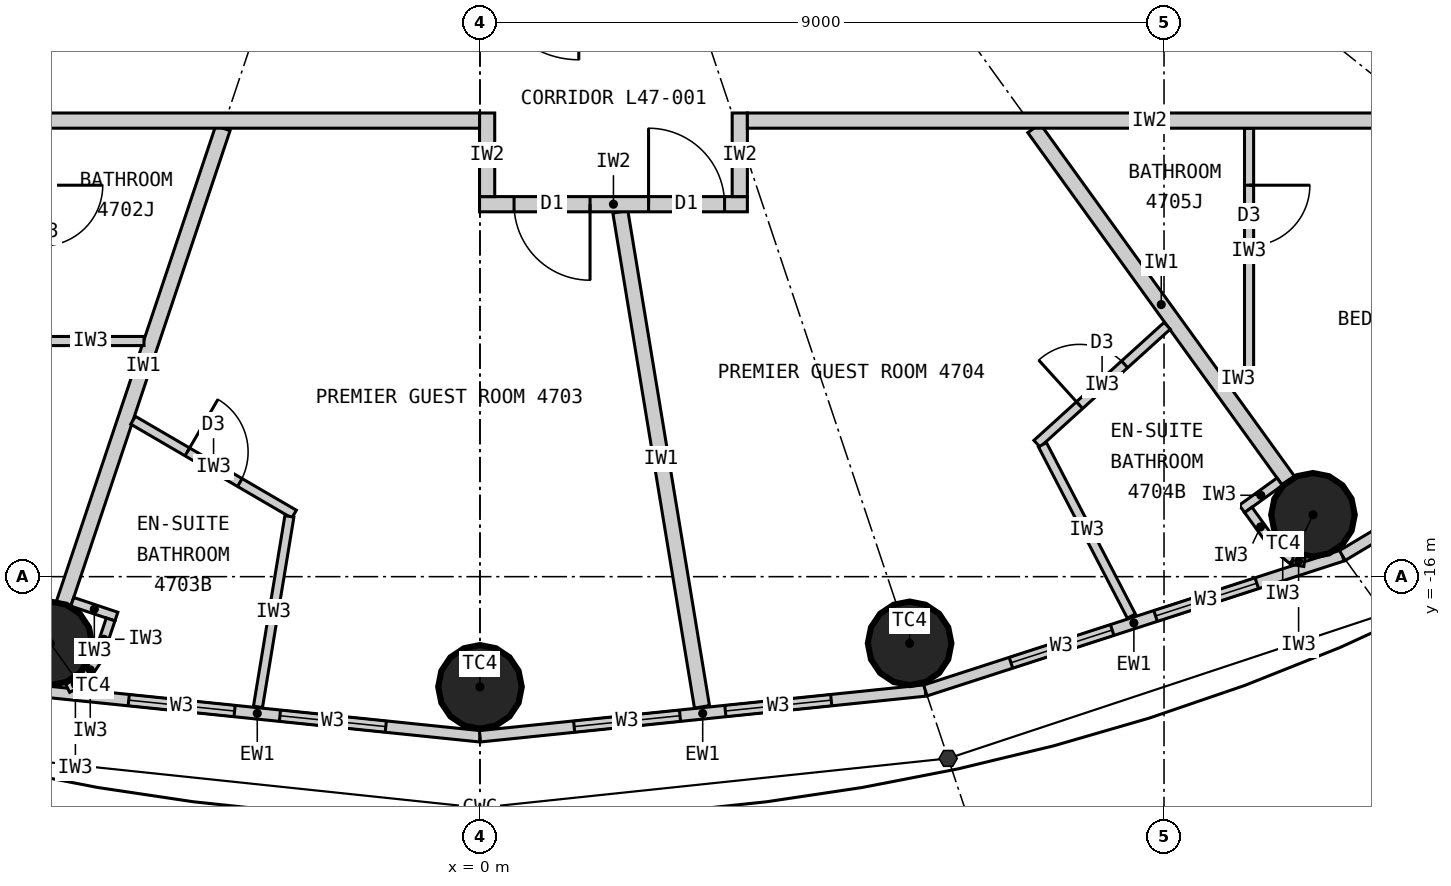
"""IFC4 building model, lengths in metres.
Left out: names, types, materials, properties, quantities, classifications, styles, units other than length and angle.
Written with IfcOpenShell. Run it as: python <this file> out.ifc"""

import sys

from ifc_helpers import new_model, si_unit, direction, frame, frame_2d, origin, origin_2d, place, context, subcontext, project, spatial, rectangle, circle, extrude, element, fill, save


model = new_model("IFC4")
c1 = context("Model", 3, precision=1e-05, world=origin(), true_north=direction((0.0, 1.0)))
c2 = subcontext(c1, "Body", "Model", "MODEL_VIEW")
j1 = project(units=[si_unit("LENGTHUNIT", "METRE"), si_unit("PLANEANGLEUNIT", "RADIAN")], contexts=[c1])
p1 = place(None, origin())
s1 = spatial("IfcSite", under=j1, at=p1, CompositionType="ELEMENT")
p2 = place(p1, origin())
s2 = spatial("IfcBuilding", under=s1, at=p2, CompositionType="ELEMENT")
p3 = place(p2, frame((0.0, 0.0, 176.4)))
s3 = spatial("IfcBuildingStorey", under=s2, at=p3, CompositionType="ELEMENT", Elevation=176.4)
for number, where, z_axis, x_axis in (
    (1, (-5.653, -16.877, 0.0), (0.0, 0.0, 1.0), (1.0, 0.0, 0.0)),
    (2, (0.0, -17.45, 0.0), (0.0, 0.0, 1.0), (1.0, 0.0, 0.0)),
    (3, (5.653, -16.877, 0.0), (0.0, 0.0, 1.0), (1.0, 0.0, 0.0)),
    (4, (10.96, -15.186, 0.0), (0.0, 0.0, 1.0), (1.0, 0.0, 0.0)),
):
    element("IfcColumn", number, at=place(p3, frame(where, z_axis=z_axis, x_axis=x_axis)), inside=s3, PredefinedType="COLUMN", context=c2, shape_type="SweptSolid", body=[
        extrude(circle(Radius=0.55, at=origin_2d()), origin(), (0.0, 0.0, 1.0), 3.3),
    ])
p4 = place(p3, frame((-5.86, -17.497, 0.0), z_axis=(0.0, 0.0, 1.0), x_axis=(0.994751738032, -0.102318032045, 0.0)))
e5 = element("IfcWall", 5, at=p4, inside=s3, PredefinedType="ELEMENTEDWALL", context=c2, shape_type="SweptSolid", body=[
    extrude(rectangle(XDim=5.891, YDim=0.15, at=frame_2d((2.946, 0.0))), origin(), (0.0, 0.0, 1.0), 3.12),
])
p5 = place(p4, frame((1.246, 0.0, 0.9)))
e6 = element("IfcOpeningElement", 6, at=p5, cuts=e5, PredefinedType="OPENING", context=c2, shape_type="SweptSolid", body=[
    extrude(rectangle(XDim=1.4, YDim=1.9, at=frame_2d((0.7, 0.95))), frame((0.0, 0.085, 0.0), z_axis=(0.0, -1.0, 0.0), x_axis=(1.0, 0.0, 0.0)), (0.0, 0.0, 1.0), 0.17),
])
p6 = place(p4, frame((3.246, 0.0, 0.9)))
e7 = element("IfcOpeningElement", 7, at=p6, cuts=e5, PredefinedType="OPENING", context=c2, shape_type="SweptSolid", body=[
    extrude(rectangle(XDim=1.4, YDim=1.9, at=frame_2d((0.7, 0.95))), frame((0.0, 0.085, 0.0), z_axis=(0.0, -1.0, 0.0), x_axis=(1.0, 0.0, 0.0)), (0.0, 0.0, 1.0), 0.17),
])
p7 = place(p3, frame((0.0, -18.1, 0.0), z_axis=(0.0, 0.0, 1.0), x_axis=(0.994751738032, 0.102318032045, 0.0)))
e8 = element("IfcWall", 8, at=p7, inside=s3, PredefinedType="ELEMENTEDWALL", context=c2, shape_type="SweptSolid", body=[
    extrude(rectangle(XDim=5.891, YDim=0.15, at=frame_2d((2.946, 0.0))), origin(), (0.0, 0.0, 1.0), 3.12),
])
p8 = place(p7, frame((1.246, 0.0, 0.9)))
e9 = element("IfcOpeningElement", 9, at=p8, cuts=e8, PredefinedType="OPENING", context=c2, shape_type="SweptSolid", body=[
    extrude(rectangle(XDim=1.4, YDim=1.9, at=frame_2d((0.7, 0.95))), frame((0.0, 0.085, 0.0), z_axis=(0.0, -1.0, 0.0), x_axis=(1.0, 0.0, 0.0)), (0.0, 0.0, 1.0), 0.17),
])
p9 = place(p7, frame((3.246, 0.0, 0.9)))
e10 = element("IfcOpeningElement", 10, at=p9, cuts=e8, PredefinedType="OPENING", context=c2, shape_type="SweptSolid", body=[
    extrude(rectangle(XDim=1.4, YDim=1.9, at=frame_2d((0.7, 0.95))), frame((0.0, 0.085, 0.0), z_axis=(0.0, -1.0, 0.0), x_axis=(1.0, 0.0, 0.0)), (0.0, 0.0, 1.0), 0.17),
])
p10 = place(p3, frame((5.86, -17.497, 0.0), z_axis=(0.0, 0.0, 1.0), x_axis=(0.951432482129, 0.307857486429, 0.0)))
e11 = element("IfcWall", 11, at=p10, inside=s3, PredefinedType="ELEMENTEDWALL", context=c2, shape_type="SweptSolid", body=[
    extrude(rectangle(XDim=5.766, YDim=0.15, at=frame_2d((2.883, 0.0))), origin(), (0.0, 0.0, 1.0), 3.12),
])
p11 = place(p10, frame((1.183, 0.0, 0.9)))
e12 = element("IfcOpeningElement", 12, at=p11, cuts=e11, PredefinedType="OPENING", context=c2, shape_type="SweptSolid", body=[
    extrude(rectangle(XDim=1.4, YDim=1.9, at=frame_2d((0.7, 0.95))), frame((0.0, 0.085, 0.0), z_axis=(0.0, -1.0, 0.0), x_axis=(1.0, 0.0, 0.0)), (0.0, 0.0, 1.0), 0.17),
])
p12 = place(p10, frame((3.183, 0.0, 0.9)))
e13 = element("IfcOpeningElement", 13, at=p12, cuts=e11, PredefinedType="OPENING", context=c2, shape_type="SweptSolid", body=[
    extrude(rectangle(XDim=1.4, YDim=1.9, at=frame_2d((0.7, 0.95))), frame((0.0, 0.085, 0.0), z_axis=(0.0, -1.0, 0.0), x_axis=(1.0, 0.0, 0.0)), (0.0, 0.0, 1.0), 0.17),
])
p13 = place(p3, frame((11.346, -15.722, 0.0), z_axis=(0.0, 0.0, 1.0), x_axis=(0.857695199231, 0.514158482587, 0.0)))
e14 = element("IfcWall", 14, at=p13, inside=s3, PredefinedType="ELEMENTEDWALL", context=c2, shape_type="SweptSolid", body=[
    extrude(rectangle(XDim=5.536, YDim=0.15, at=frame_2d((2.768, 0.0))), origin(), (0.0, 0.0, 1.0), 3.12),
])
p14 = place(p13, frame((1.068, 0.0, 0.9)))
e15 = element("IfcOpeningElement", 15, at=p14, cuts=e14, PredefinedType="OPENING", context=c2, shape_type="SweptSolid", body=[
    extrude(rectangle(XDim=1.4, YDim=1.9, at=frame_2d((0.7, 0.95))), frame((0.0, 0.085, 0.0), z_axis=(0.0, -1.0, 0.0), x_axis=(1.0, 0.0, 0.0)), (0.0, 0.0, 1.0), 0.17),
])
p15 = place(p13, frame((3.068, 0.0, 0.9)))
e16 = element("IfcOpeningElement", 16, at=p15, cuts=e14, PredefinedType="OPENING", context=c2, shape_type="SweptSolid", body=[
    extrude(rectangle(XDim=1.4, YDim=1.9, at=frame_2d((0.7, 0.95))), frame((0.0, 0.085, 0.0), z_axis=(0.0, -1.0, 0.0), x_axis=(1.0, 0.0, 0.0)), (0.0, 0.0, 1.0), 0.17),
])
p16 = place(p3, frame((-3.383, -10.1, 0.0), z_axis=(0.0, 0.0, 1.0), x_axis=(-0.317615120474, -0.948219718866, 0.0)))
e17 = element("IfcWall", 17, at=p16, inside=s3, PredefinedType="PARTITIONING", context=c2, shape_type="SweptSolid", body=[
    extrude(rectangle(XDim=6.597, YDim=0.2, at=frame_2d((3.299, 0.0))), origin(), (0.0, 0.0, 1.0), 2.42),
])
p17 = place(p3, frame((1.847, -11.2, 0.0), z_axis=(0.0, 0.0, 1.0), x_axis=(0.162695449404, -0.986676335352, 0.0)))
e18 = element("IfcWall", 18, at=p17, inside=s3, PredefinedType="PARTITIONING", context=c2, shape_type="SweptSolid", body=[
    extrude(rectangle(XDim=6.601, YDim=0.2, at=frame_2d((3.301, 0.0))), origin(), (0.0, 0.0, 1.0), 3.12),
])
p18 = place(p3, frame((7.289, -10.1, 0.0), z_axis=(0.0, 0.0, 1.0), x_axis=(0.585222595178, -0.810872686735, 0.0)))
e19 = element("IfcWall", 19, at=p18, inside=s3, PredefinedType="PARTITIONING", context=c2, shape_type="SweptSolid", body=[
    extrude(rectangle(XDim=5.722, YDim=0.2, at=frame_2d((2.861, 0.0))), origin(), (0.0, 0.0, 1.0), 2.42),
])
p19 = place(p3, frame((3.518, -11.1, 0.0), z_axis=(0.0, 0.0, 1.0), x_axis=(-1.0, 0.0, 0.0)))
e20 = element("IfcWall", 20, at=p19, inside=s3, PredefinedType="PARTITIONING", context=c2, shape_type="SweptSolid", body=[
    extrude(rectangle(XDim=3.524, YDim=0.2, at=frame_2d((1.762, 0.0))), origin(), (0.0, 0.0, 1.0), 3.12),
])
p20 = place(p19, frame((2.07, 0.0, 0.0)))
e21 = element("IfcOpeningElement", 21, at=p20, cuts=e20, PredefinedType="OPENING", context=c2, shape_type="SweptSolid", body=[
    extrude(rectangle(XDim=1.0, YDim=2.2, at=frame_2d((0.5, 1.1))), frame((0.0, 0.11, 0.0), z_axis=(0.0, -1.0, 0.0), x_axis=(1.0, 0.0, 0.0)), (0.0, 0.0, 1.0), 0.22),
])
p21 = place(p19, frame((0.3, 0.0, 0.0)))
e22 = element("IfcOpeningElement", 22, at=p21, cuts=e20, PredefinedType="OPENING", context=c2, shape_type="SweptSolid", body=[
    extrude(rectangle(XDim=1.0, YDim=2.2, at=frame_2d((0.5, 1.1))), frame((0.0, 0.11, 0.0), z_axis=(0.0, -1.0, 0.0), x_axis=(1.0, 0.0, 0.0)), (0.0, 0.0, 1.0), 0.22),
])
p22 = place(p3, frame((3.418, -9.9, 0.0), z_axis=(0.0, 0.0, 1.0), x_axis=(0.0, -1.0, 0.0)))
e23 = element("IfcWall", 23, at=p22, inside=s3, PredefinedType="PARTITIONING", context=c2, shape_type="SweptSolid", body=[
    extrude(rectangle(XDim=1.1, YDim=0.2, at=frame_2d((0.55, 0.0))), origin(), (0.0, 0.0, 1.0), 3.12),
])
p23 = place(p3, frame((0.094, -9.9, 0.0), z_axis=(0.0, 0.0, 1.0), x_axis=(0.0, -1.0, 0.0)))
e24 = element("IfcWall", 24, at=p23, inside=s3, PredefinedType="PARTITIONING", context=c2, shape_type="SweptSolid", body=[
    extrude(rectangle(XDim=1.1, YDim=0.2, at=frame_2d((0.55, 0.0))), origin(), (0.0, 0.0, 1.0), 2.42),
])
p24 = place(p3, frame((-4.421, -12.9, 0.0), z_axis=(0.0, 0.0, 1.0), x_axis=(-1.0, 0.0, 0.0)))
e25 = element("IfcWall", 25, at=p24, inside=s3, PredefinedType="PARTITIONING", context=c2, shape_type="SweptSolid", body=[
    extrude(rectangle(XDim=1.402, YDim=0.12, at=frame_2d((0.701, 0.0))), origin(), (0.0, 0.0, 1.0), 3.12),
])
p25 = place(p3, frame((-4.564, -13.942, 0.0), z_axis=(0.0, 0.0, 1.0), x_axis=(0.863717519451, -0.503976236139, 0.0)))
e26 = element("IfcWall", 26, at=p25, inside=s3, PredefinedType="PARTITIONING", context=c2, shape_type="SweptSolid", body=[
    extrude(rectangle(XDim=2.453, YDim=0.12, at=frame_2d((1.226, 0.0))), origin(), (0.0, 0.0, 1.0), 3.12),
])
p26 = place(p25, frame((0.826, 0.0, 0.0)))
e27 = element("IfcOpeningElement", 27, at=p26, cuts=e26, PredefinedType="OPENING", context=c2, shape_type="SweptSolid", body=[
    extrude(rectangle(XDim=0.8, YDim=2.1, at=frame_2d((0.4, 1.05))), frame((0.0, 0.07, 0.0), z_axis=(0.0, -1.0, 0.0), x_axis=(1.0, 0.0, 0.0)), (0.0, 0.0, 1.0), 0.14),
])
p27 = place(p3, frame((-2.508, -15.207, 0.0), z_axis=(0.0, 0.0, 1.0), x_axis=(-0.162637365963, -0.986685911115, 0.0)))
e28 = element("IfcWall", 28, at=p27, inside=s3, PredefinedType="PARTITIONING", context=c2, shape_type="SweptSolid", body=[
    extrude(rectangle(XDim=2.54, YDim=0.12, at=frame_2d((1.27, 0.0))), origin(), (0.0, 0.0, 1.0), 3.12),
])
p28 = place(p3, frame((-5.364, -16.331, 0.0), z_axis=(0.0, 0.0, 1.0), x_axis=(0.948283770087, -0.317423835572, 0.0)))
e29 = element("IfcWall", 29, at=p28, inside=s3, PredefinedType="PARTITIONING", context=c2, shape_type="SweptSolid", body=[
    extrude(rectangle(XDim=0.612, YDim=0.12, at=frame_2d((0.306, 0.0))), origin(), (0.0, 0.0, 1.0), 3.12),
])
p29 = place(p3, frame((-4.86, -16.563, 0.0), z_axis=(0.0, 0.0, 1.0), x_axis=(-0.317825321803, -0.948149284038, 0.0)))
e30 = element("IfcWall", 30, at=p29, inside=s3, PredefinedType="PARTITIONING", context=c2, shape_type="SweptSolid", body=[
    extrude(rectangle(XDim=0.55, YDim=0.12, at=frame_2d((0.275, 0.0))), origin(), (0.0, 0.0, 1.0), 3.12),
])
p30 = place(p3, frame((-5.034, -17.084, 0.0), z_axis=(0.0, 0.0, 1.0), x_axis=(-0.552362205726, -0.833604218851, 0.0)))
e31 = element("IfcWall", 31, at=p30, inside=s3, PredefinedType="PARTITIONING", context=c2, shape_type="SweptSolid", body=[
    extrude(rectangle(XDim=0.338, YDim=0.12, at=frame_2d((0.169, 0.0))), origin(), (0.0, 0.0, 1.0), 3.12),
])
p31 = place(p3, frame((-5.221, -17.366, 0.0), z_axis=(0.0, 0.0, 1.0), x_axis=(-0.895067896179, -0.445929883759, 0.0)))
e32 = element("IfcWall", 32, at=p31, inside=s3, PredefinedType="PARTITIONING", context=c2, shape_type="SweptSolid", body=[
    extrude(rectangle(XDim=0.228, YDim=0.12, at=frame_2d((0.114, 0.0))), origin(), (0.0, 0.0, 1.0), 3.12),
])
p32 = place(p3, frame((9.042, -12.699, 0.0), z_axis=(0.0, 0.0, 1.0), x_axis=(-0.741100257539, -0.671394376112, 0.0)))
e33 = element("IfcWall", 33, at=p32, inside=s3, PredefinedType="PARTITIONING", context=c2, shape_type="SweptSolid", body=[
    extrude(rectangle(XDim=2.312, YDim=0.12, at=frame_2d((1.156, 0.0))), origin(), (0.0, 0.0, 1.0), 3.12),
])
p33 = place(p32, frame((0.756, 0.0, 0.0)))
e34 = element("IfcOpeningElement", 34, at=p33, cuts=e33, PredefinedType="OPENING", context=c2, shape_type="SweptSolid", body=[
    extrude(rectangle(XDim=0.8, YDim=2.1, at=frame_2d((0.4, 1.05))), frame((0.0, 0.07, 0.0), z_axis=(0.0, -1.0, 0.0), x_axis=(1.0, 0.0, 0.0)), (0.0, 0.0, 1.0), 0.14),
])
p34 = place(p3, frame((7.401, -14.264, 0.0), z_axis=(0.0, 0.0, 1.0), x_axis=(0.460505131319, -0.887657041897, 0.0)))
e35 = element("IfcWall", 35, at=p34, inside=s3, PredefinedType="PARTITIONING", context=c2, shape_type="SweptSolid", body=[
    extrude(rectangle(XDim=2.54, YDim=0.12, at=frame_2d((1.27, 0.0))), origin(), (0.0, 0.0, 1.0), 3.12),
])
p35 = place(p3, frame((10.522, -14.75, 0.0), z_axis=(0.0, 0.0, 1.0), x_axis=(-0.811057588427, -0.584966313777, 0.0)))
e36 = element("IfcWall", 36, at=p35, inside=s3, PredefinedType="PARTITIONING", context=c2, shape_type="SweptSolid", body=[
    extrude(rectangle(XDim=0.612, YDim=0.12, at=frame_2d((0.306, 0.0))), origin(), (0.0, 0.0, 1.0), 3.12),
])
p36 = place(p3, frame((10.109, -15.122, 0.0), z_axis=(0.0, 0.0, 1.0), x_axis=(0.585344718358, -0.810784534072, 0.0)))
e37 = element("IfcWall", 37, at=p36, inside=s3, PredefinedType="PARTITIONING", context=c2, shape_type="SweptSolid", body=[
    extrude(rectangle(XDim=0.55, YDim=0.12, at=frame_2d((0.275, 0.0))), origin(), (0.0, 0.0, 1.0), 3.12),
])
p37 = place(p3, frame((10.431, -15.568, 0.0), z_axis=(0.0, 0.0, 1.0), x_axis=(0.77505137267, -0.631898227345, 0.0)))
e38 = element("IfcWall", 38, at=p37, inside=s3, PredefinedType="PARTITIONING", context=c2, shape_type="SweptSolid", body=[
    extrude(rectangle(XDim=0.338, YDim=0.12, at=frame_2d((0.169, 0.0))), origin(), (0.0, 0.0, 1.0), 3.12),
])
p38 = place(p3, frame((10.693, -15.781, 0.0), z_axis=(0.0, 0.0, 1.0), x_axis=(0.987256785332, -0.159135287777, 0.0)))
e39 = element("IfcWall", 39, at=p38, inside=s3, PredefinedType="PARTITIONING", context=c2, shape_type="SweptSolid", body=[
    extrude(rectangle(XDim=0.158, YDim=0.12, at=frame_2d((0.079, 0.0))), origin(), (0.0, 0.0, 1.0), 3.12),
])
p39 = place(p3, frame((9.771, -13.4, 0.0), z_axis=(0.0, 0.0, 1.0), x_axis=(1.0, 0.0, 0.0)))
e40 = element("IfcWall", 40, at=p39, inside=s3, PredefinedType="PARTITIONING", context=c2, shape_type="SweptSolid", body=[
    extrude(rectangle(XDim=0.408, YDim=0.12, at=frame_2d((0.204, 0.0))), origin(), (0.0, 0.0, 1.0), 3.12),
])
p40 = place(p3, frame((10.119, -10.1, 0.0), z_axis=(0.0, 0.0, 1.0), x_axis=(0.0, -1.0, 0.0)))
e41 = element("IfcWall", 41, at=p40, inside=s3, PredefinedType="PARTITIONING", context=c2, shape_type="SweptSolid", body=[
    extrude(rectangle(XDim=3.24, YDim=0.12, at=frame_2d((1.62, 0.0))), origin(), (0.0, 0.0, 1.0), 3.12),
])
p41 = place(p40, frame((0.75, 0.0, 0.0)))
e42 = element("IfcOpeningElement", 42, at=p41, cuts=e41, PredefinedType="OPENING", context=c2, shape_type="SweptSolid", body=[
    extrude(rectangle(XDim=0.8, YDim=2.1, at=frame_2d((0.4, 1.05))), frame((0.0, 0.07, 0.0), z_axis=(0.0, -1.0, 0.0), x_axis=(1.0, 0.0, 0.0)), (0.0, 0.0, 1.0), 0.14),
])
p42 = place(p3, frame((14.1, -10.0, 0.0), z_axis=(0.0, 0.0, 1.0), x_axis=(-1.0, 0.0, 0.0)))
e43 = element("IfcWall", 43, at=p42, inside=s3, PredefinedType="PARTITIONING", context=c2, shape_type="SweptSolid", body=[
    extrude(rectangle(XDim=10.582, YDim=0.2, at=frame_2d((5.291, 0.0))), origin(), (0.0, 0.0, 1.0), 3.12),
])
p43 = place(p3, frame((-0.006, -10.0, 0.0), z_axis=(0.0, 0.0, 1.0), x_axis=(-1.0, 0.0, 0.0)))
e44 = element("IfcWall", 44, at=p43, inside=s3, PredefinedType="PARTITIONING", context=c2, shape_type="SweptSolid", body=[
    extrude(rectangle(XDim=14.094, YDim=0.2, at=frame_2d((7.047, 0.0))), origin(), (0.0, 0.0, 1.0), 3.12),
])
p44 = place(p43, frame((10.059, 0.0, 0.0)))
e45 = element("IfcOpeningElement", 45, at=p44, cuts=e44, PredefinedType="OPENING", context=c2, shape_type="SweptSolid", body=[
    extrude(rectangle(XDim=1.0, YDim=2.2, at=frame_2d((0.5, 1.1))), frame((0.0, 0.11, 0.0), z_axis=(0.0, -1.0, 0.0), x_axis=(1.0, 0.0, 0.0)), (0.0, 0.0, 1.0), 0.22),
])
p45 = place(p5, origin())
e46 = element("IfcWindow", 46, at=p45, inside=s3, PartitioningType="SINGLE_PANEL", PredefinedType="WINDOW", context=c2, shape_type="SweptSolid", body=[
    extrude(rectangle(XDim=1.4, YDim=1.9, at=frame_2d((0.7, 0.95))), frame((0.0, 0.03, 0.0), z_axis=(0.0, -1.0, 0.0), x_axis=(1.0, 0.0, 0.0)), (0.0, 0.0, 1.0), 0.06),
])
fill(e6, e46)
p46 = place(p6, origin())
e47 = element("IfcWindow", 47, at=p46, inside=s3, PartitioningType="SINGLE_PANEL", PredefinedType="WINDOW", context=c2, shape_type="SweptSolid", body=[
    extrude(rectangle(XDim=1.4, YDim=1.9, at=frame_2d((0.7, 0.95))), frame((0.0, 0.03, 0.0), z_axis=(0.0, -1.0, 0.0), x_axis=(1.0, 0.0, 0.0)), (0.0, 0.0, 1.0), 0.06),
])
fill(e7, e47)
p47 = place(p8, origin())
e48 = element("IfcWindow", 48, at=p47, inside=s3, PartitioningType="SINGLE_PANEL", PredefinedType="WINDOW", context=c2, shape_type="SweptSolid", body=[
    extrude(rectangle(XDim=1.4, YDim=1.9, at=frame_2d((0.7, 0.95))), frame((0.0, 0.03, 0.0), z_axis=(0.0, -1.0, 0.0), x_axis=(1.0, 0.0, 0.0)), (0.0, 0.0, 1.0), 0.06),
])
fill(e9, e48)
p48 = place(p9, origin())
e49 = element("IfcWindow", 49, at=p48, inside=s3, PartitioningType="SINGLE_PANEL", PredefinedType="WINDOW", context=c2, shape_type="SweptSolid", body=[
    extrude(rectangle(XDim=1.4, YDim=1.9, at=frame_2d((0.7, 0.95))), frame((0.0, 0.03, 0.0), z_axis=(0.0, -1.0, 0.0), x_axis=(1.0, 0.0, 0.0)), (0.0, 0.0, 1.0), 0.06),
])
fill(e10, e49)
p49 = place(p11, origin())
e50 = element("IfcWindow", 50, at=p49, inside=s3, PartitioningType="SINGLE_PANEL", PredefinedType="WINDOW", context=c2, shape_type="SweptSolid", body=[
    extrude(rectangle(XDim=1.4, YDim=1.9, at=frame_2d((0.7, 0.95))), frame((0.0, 0.03, 0.0), z_axis=(0.0, -1.0, 0.0), x_axis=(1.0, 0.0, 0.0)), (0.0, 0.0, 1.0), 0.06),
])
fill(e12, e50)
p50 = place(p12, origin())
e51 = element("IfcWindow", 51, at=p50, inside=s3, PartitioningType="SINGLE_PANEL", PredefinedType="WINDOW", context=c2, shape_type="SweptSolid", body=[
    extrude(rectangle(XDim=1.4, YDim=1.9, at=frame_2d((0.7, 0.95))), frame((0.0, 0.03, 0.0), z_axis=(0.0, -1.0, 0.0), x_axis=(1.0, 0.0, 0.0)), (0.0, 0.0, 1.0), 0.06),
])
fill(e13, e51)
p51 = place(p26, origin())
e52 = element("IfcDoor", 52, at=p51, inside=s3, OperationType="SINGLE_SWING_LEFT", PredefinedType="DOOR", context=c2, shape_type="SweptSolid", body=[
    extrude(rectangle(XDim=0.8, YDim=2.1, at=frame_2d((0.4, 1.05))), frame((0.0, 0.025, 0.0), z_axis=(0.0, -1.0, 0.0), x_axis=(1.0, 0.0, 0.0)), (0.0, 0.0, 1.0), 0.05),
])
fill(e27, e52)
p52 = place(p20, origin())
e53 = element("IfcDoor", 53, at=p52, inside=s3, OperationType="SINGLE_SWING_LEFT", PredefinedType="DOOR", context=c2, shape_type="SweptSolid", body=[
    extrude(rectangle(XDim=1.0, YDim=2.2, at=frame_2d((0.5, 1.1))), frame((0.0, 0.025, 0.0), z_axis=(0.0, -1.0, 0.0), x_axis=(1.0, 0.0, 0.0)), (0.0, 0.0, 1.0), 0.05),
])
fill(e21, e53)
p53 = place(p33, origin())
e54 = element("IfcDoor", 54, at=p53, inside=s3, OperationType="SINGLE_SWING_RIGHT", PredefinedType="DOOR", context=c2, shape_type="SweptSolid", body=[
    extrude(rectangle(XDim=0.8, YDim=2.1, at=frame_2d((0.4, 1.05))), frame((0.0, 0.025, 0.0), z_axis=(0.0, -1.0, 0.0), x_axis=(1.0, 0.0, 0.0)), (0.0, 0.0, 1.0), 0.05),
])
fill(e34, e54)
p54 = place(p21, origin())
e55 = element("IfcDoor", 55, at=p54, inside=s3, OperationType="SINGLE_SWING_RIGHT", PredefinedType="DOOR", context=c2, shape_type="SweptSolid", body=[
    extrude(rectangle(XDim=1.0, YDim=2.2, at=frame_2d((0.5, 1.1))), frame((0.0, 0.025, 0.0), z_axis=(0.0, -1.0, 0.0), x_axis=(1.0, 0.0, 0.0)), (0.0, 0.0, 1.0), 0.05),
])
fill(e22, e55)
p55 = place(p41, origin())
e56 = element("IfcDoor", 56, at=p55, inside=s3, OperationType="SINGLE_SWING_LEFT", PredefinedType="DOOR", context=c2, shape_type="SweptSolid", body=[
    extrude(rectangle(XDim=0.8, YDim=2.1, at=frame_2d((0.4, 1.05))), frame((0.0, 0.025, 0.0), z_axis=(0.0, -1.0, 0.0), x_axis=(1.0, 0.0, 0.0)), (0.0, 0.0, 1.0), 0.05),
])
fill(e42, e56)
save(model, sys.argv[1])
